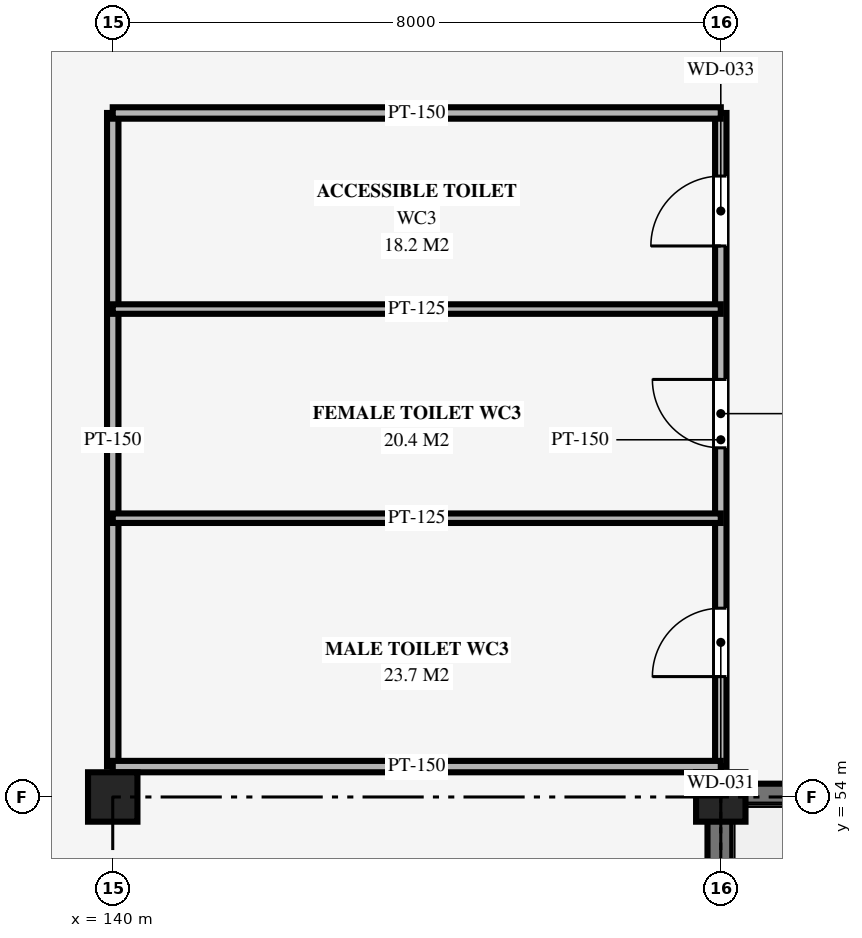
"""IFC4 building model, lengths in metres.
Left out: names, types, materials, properties, quantities, classifications, styles, units other than length and angle.
Written with IfcOpenShell. Run it as: python <this file> out.ifc"""

import sys

from ifc_helpers import new_model, si_unit, direction, frame, frame_2d, origin, origin_2d, place, context, subcontext, project, spatial, rectangle, extrude, element, fill, save


model = new_model("IFC4")
c1 = context("Model", 3, precision=1e-05, world=origin(), true_north=direction((0.0, 1.0)))
c2 = subcontext(c1, "Body", "Model", "MODEL_VIEW")
j1 = project(units=[si_unit("LENGTHUNIT", "METRE"), si_unit("PLANEANGLEUNIT", "RADIAN")], contexts=[c1])
p1 = place(None, origin())
s1 = spatial("IfcSite", under=j1, at=p1, CompositionType="ELEMENT")
p2 = place(p1, origin())
s2 = spatial("IfcBuilding", under=s1, at=p2, CompositionType="ELEMENT")
p3 = place(p2, frame((0.0, 0.0, 5.4)))
s3 = spatial("IfcBuildingStorey", under=s2, at=p3, CompositionType="ELEMENT", Elevation=5.4)
for number, where, z_axis, x_axis in (
    (1, (140.0, 54.0, 0.0), (0.0, 0.0, 1.0), (1.0, 0.0, 0.0)),
    (2, (148.0, 54.0, 0.0), (0.0, 0.0, 1.0), (1.0, 0.0, 0.0)),
):
    element("IfcColumn", number, at=place(p3, frame(where, z_axis=z_axis, x_axis=x_axis)), inside=s3, PredefinedType="COLUMN", context=c2, shape_type="SweptSolid", body=[
        extrude(rectangle(XDim=0.65, YDim=0.65, at=origin_2d()), origin(), (0.0, 0.0, 1.0), 4.64),
    ])
p4 = place(p3, frame((148.0, 54.0, 0.0), z_axis=(0.0, 0.0, 1.0), x_axis=(1.0, 0.0, 0.0)))
e3 = element("IfcWall", 3, at=p4, inside=s3, PredefinedType="SHEAR", context=c2, shape_type="SweptSolid", body=[
    extrude(rectangle(XDim=8.0, YDim=0.35, at=frame_2d((4.0, 0.0))), origin(), (0.0, 0.0, 1.0), 4.78),
])
p5 = place(p3, frame((148.0, 42.0, 0.0), z_axis=(0.0, 0.0, 1.0), x_axis=(0.0, 1.0, 0.0)))
e4 = element("IfcWall", 4, at=p5, inside=s3, PredefinedType="SHEAR", context=c2, shape_type="SweptSolid", body=[
    extrude(rectangle(XDim=12.0, YDim=0.35, at=frame_2d((6.0, 0.0))), origin(), (0.0, 0.0, 1.0), 4.78),
])
p6 = place(p3, frame((140.0, 54.4, 0.0), z_axis=(0.0, 0.0, 1.0), x_axis=(0.0, 1.0, 0.0)))
e5 = element("IfcWall", 5, at=p6, inside=s3, PredefinedType="PARTITIONING", context=c2, shape_type="SweptSolid", body=[
    extrude(rectangle(XDim=8.6, YDim=0.15, at=frame_2d((4.3, 0.0))), origin(), (0.0, 0.0, 1.0), 3.65),
])
p7 = place(p3, frame((148.0, 54.4, 0.0), z_axis=(0.0, 0.0, 1.0), x_axis=(0.0, 1.0, 0.0)))
e6 = element("IfcWall", 6, at=p7, inside=s3, PredefinedType="PARTITIONING", context=c2, shape_type="SweptSolid", body=[
    extrude(rectangle(XDim=8.6, YDim=0.15, at=frame_2d((4.3, 0.0))), origin(), (0.0, 0.0, 1.0), 3.65),
])
p8 = place(p7, frame((1.184, 0.0, 0.0)))
e7 = element("IfcOpeningElement", 7, at=p8, cuts=e6, PredefinedType="OPENING", context=c2, shape_type="SweptSolid", body=[
    extrude(rectangle(XDim=0.9, YDim=2.1, at=frame_2d((0.45, 1.05))), frame((0.0, 0.085, 0.0), z_axis=(0.0, -1.0, 0.0), x_axis=(1.0, 0.0, 0.0)), (0.0, 0.0, 1.0), 0.17),
])
p9 = place(p7, frame((4.194, 0.0, 0.0)))
e8 = element("IfcOpeningElement", 8, at=p9, cuts=e6, PredefinedType="OPENING", context=c2, shape_type="SweptSolid", body=[
    extrude(rectangle(XDim=0.9, YDim=2.1, at=frame_2d((0.45, 1.05))), frame((0.0, 0.085, 0.0), z_axis=(0.0, -1.0, 0.0), x_axis=(1.0, 0.0, 0.0)), (0.0, 0.0, 1.0), 0.17),
])
p10 = place(p7, frame((6.85, 0.0, 0.0)))
e9 = element("IfcOpeningElement", 9, at=p10, cuts=e6, PredefinedType="OPENING", context=c2, shape_type="SweptSolid", body=[
    extrude(rectangle(XDim=0.92, YDim=2.1, at=frame_2d((0.46, 1.05))), frame((0.0, 0.085, 0.0), z_axis=(0.0, -1.0, 0.0), x_axis=(1.0, 0.0, 0.0)), (0.0, 0.0, 1.0), 0.17),
])
for number, where, z_axis, x_axis in (
    (10, (140.0, 63.0, 0.0), (0.0, 0.0, 1.0), (1.0, 0.0, 0.0)),
    (11, (140.0, 54.4, 0.0), (0.0, 0.0, 1.0), (1.0, 0.0, 0.0)),
):
    element("IfcWall", number, at=place(p3, frame(where, z_axis=z_axis, x_axis=x_axis)), inside=s3, PredefinedType="PARTITIONING", context=c2, shape_type="SweptSolid", body=[
        extrude(rectangle(XDim=8.0, YDim=0.15, at=frame_2d((4.0, 0.0))), origin(), (0.0, 0.0, 1.0), 3.65),
    ])
for number, where, z_axis, x_axis in (
    (12, (140.0, 57.668, 0.0), (0.0, 0.0, 1.0), (1.0, 0.0, 0.0)),
    (13, (140.0, 60.42, 0.0), (0.0, 0.0, 1.0), (1.0, 0.0, 0.0)),
):
    element("IfcWall", number, at=place(p3, frame(where, z_axis=z_axis, x_axis=x_axis)), inside=s3, PredefinedType="PARTITIONING", context=c2, shape_type="SweptSolid", body=[
        extrude(rectangle(XDim=8.0, YDim=0.125, at=frame_2d((4.0, 0.0))), origin(), (0.0, 0.0, 1.0), 3.65),
    ])
p11 = place(p8, origin())
e14 = element("IfcDoor", 14, at=p11, inside=s3, OperationType="SINGLE_SWING_LEFT", PredefinedType="DOOR", context=c2, shape_type="SweptSolid", body=[
    extrude(rectangle(XDim=0.9, YDim=2.1, at=frame_2d((0.45, 1.05))), frame((0.0, 0.025, 0.0), z_axis=(0.0, -1.0, 0.0), x_axis=(1.0, 0.0, 0.0)), (0.0, 0.0, 1.0), 0.05),
])
fill(e7, e14)
p12 = place(p9, origin())
e15 = element("IfcDoor", 15, at=p12, inside=s3, OperationType="SINGLE_SWING_RIGHT", PredefinedType="DOOR", context=c2, shape_type="SweptSolid", body=[
    extrude(rectangle(XDim=0.9, YDim=2.1, at=frame_2d((0.45, 1.05))), frame((0.0, 0.025, 0.0), z_axis=(0.0, -1.0, 0.0), x_axis=(1.0, 0.0, 0.0)), (0.0, 0.0, 1.0), 0.05),
])
fill(e8, e15)
p13 = place(p10, origin())
e16 = element("IfcDoor", 16, at=p13, inside=s3, OperationType="SINGLE_SWING_LEFT", PredefinedType="DOOR", context=c2, shape_type="SweptSolid", body=[
    extrude(rectangle(XDim=0.92, YDim=2.1, at=frame_2d((0.46, 1.05))), frame((0.0, 0.025, 0.0), z_axis=(0.0, -1.0, 0.0), x_axis=(1.0, 0.0, 0.0)), (0.0, 0.0, 1.0), 0.05),
])
fill(e9, e16)
save(model, sys.argv[1])
